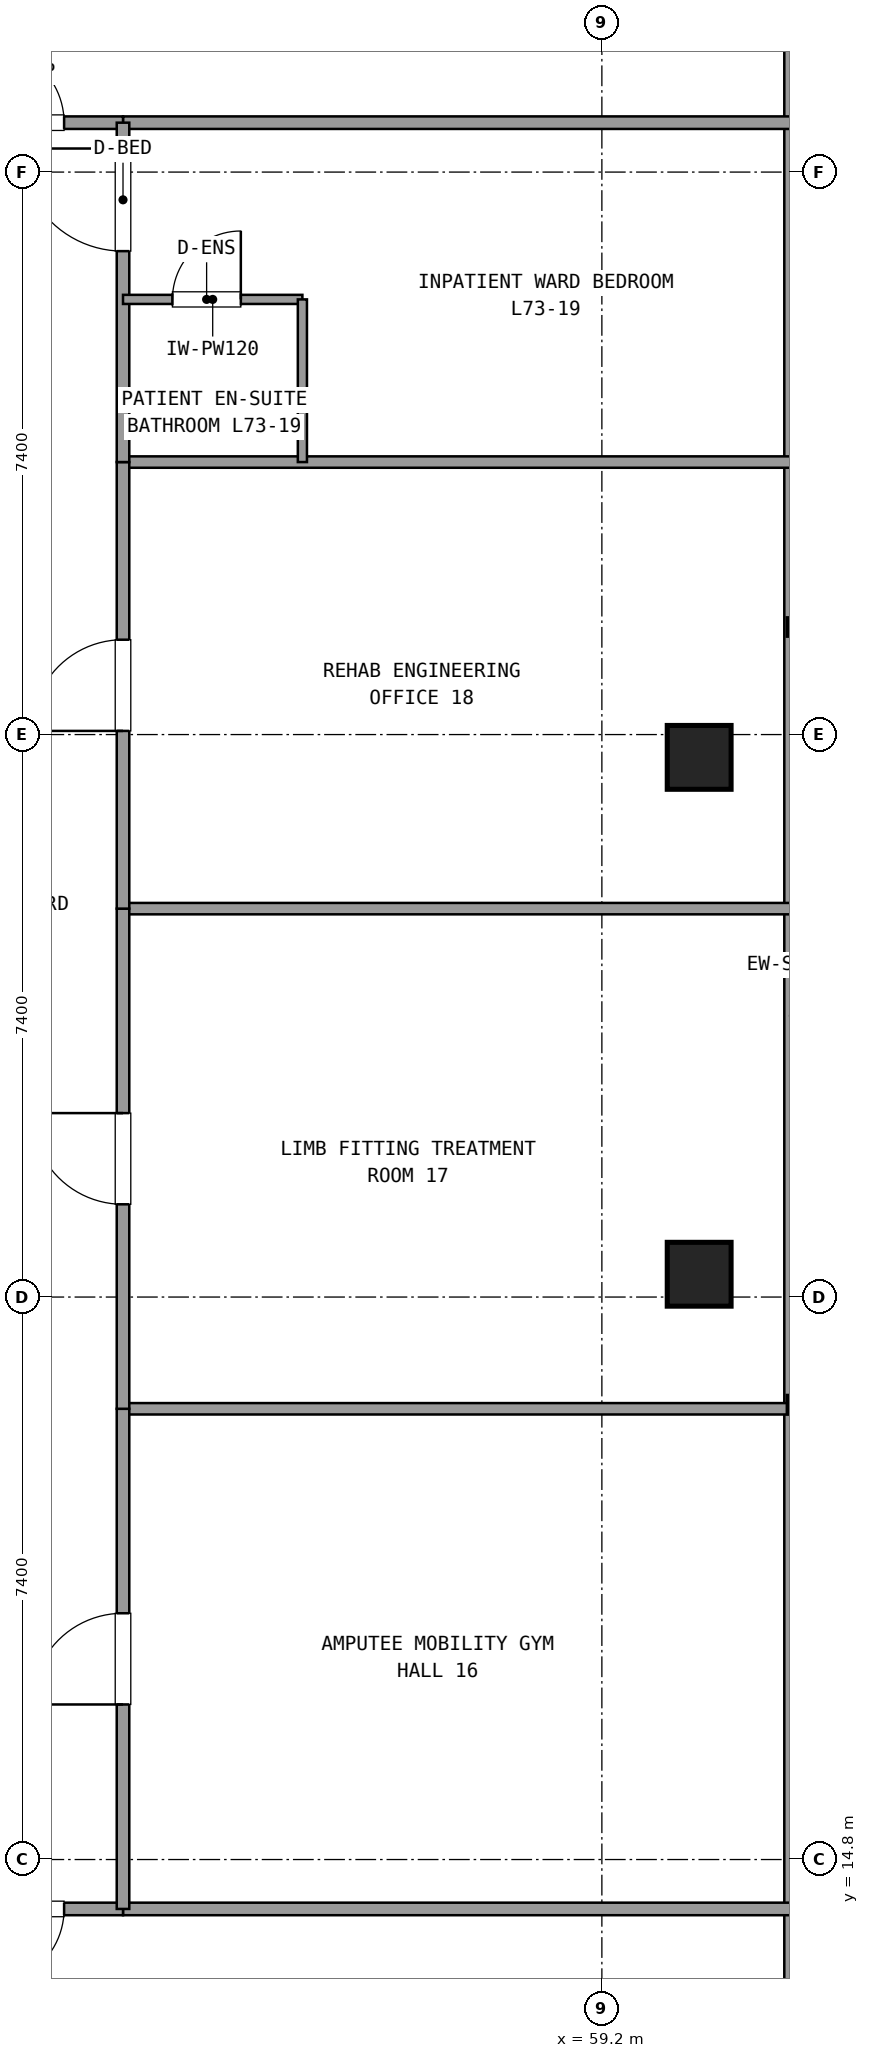
"""IFC4 building model, lengths in metres.
Left out: names, types, materials, properties, quantities, classifications, styles, units other than length and angle.
Written with IfcOpenShell. Run it as: python <this file> out.ifc"""

import sys

from ifc_helpers import new_model, si_unit, direction, frame, frame_2d, origin, origin_2d, place, context, subcontext, project, spatial, rectangle, extrude, element, fill, save


model = new_model("IFC4")
c1 = context("Model", 3, precision=1e-05, world=origin(), true_north=direction((0.0, 1.0)))
c2 = subcontext(c1, "Body", "Model", "MODEL_VIEW")
j1 = project(units=[si_unit("LENGTHUNIT", "METRE"), si_unit("PLANEANGLEUNIT", "RADIAN")], contexts=[c1])
p1 = place(None, origin())
s1 = spatial("IfcSite", under=j1, at=p1, CompositionType="ELEMENT")
p2 = place(p1, origin())
s2 = spatial("IfcBuilding", under=s1, at=p2, CompositionType="ELEMENT")
p3 = place(p2, frame((0.0, 0.0, 282.42)))
s3 = spatial("IfcBuildingStorey", under=s2, at=p3, CompositionType="ELEMENT", Elevation=282.42)
for number, where, z_axis, x_axis in (
    (1, (60.48, 22.5, 0.0), (0.0, 0.0, 1.0), (1.0, 0.0, 0.0)),
    (2, (60.48, 29.3, 0.0), (0.0, 0.0, 1.0), (1.0, 0.0, 0.0)),
):
    element("IfcColumn", number, at=place(p3, frame(where, z_axis=z_axis, x_axis=x_axis)), inside=s3, PredefinedType="COLUMN", context=c2, shape_type="SweptSolid", body=[
        extrude(rectangle(XDim=0.84, YDim=0.84, at=origin_2d()), origin(), (0.0, 0.0, 1.0), 3.6),
    ])
p4 = place(p3, frame((61.72, 10.555, 0.0), z_axis=(0.0, 0.0, 1.0), x_axis=(0.0, 1.0, 0.0)))
e3 = element("IfcWall", 3, at=p4, inside=s3, PredefinedType="SOLIDWALL", context=c2, shape_type="SweptSolid", body=[
    extrude(rectangle(XDim=30.69, YDim=0.24, at=frame_2d((15.345, 0.0))), origin(), (0.0, 0.0, 1.0), 0.85),
])
for number, where, z_axis, x_axis in (
    (4, (52.9, 37.65, 0.0), (0.0, 0.0, 1.0), (1.0, 0.0, 0.0)),
    (5, (52.9, 14.15, 0.0), (0.0, 0.0, 1.0), (1.0, 0.0, 0.0)),
):
    element("IfcWall", number, at=place(p3, frame(where, z_axis=z_axis, x_axis=x_axis)), inside=s3, PredefinedType="PARTITIONING", context=c2, shape_type="SweptSolid", body=[
        extrude(rectangle(XDim=8.8, YDim=0.165, at=frame_2d((4.4, 0.0))), origin(), (0.0, 0.0, 1.0), 2.24),
    ])
p5 = place(p3, frame((50.35, 37.65, 0.0), z_axis=(0.0, 0.0, 1.0), x_axis=(1.0, 0.0, 0.0)))
e6 = element("IfcWall", 6, at=p5, inside=s3, PredefinedType="PARTITIONING", context=c2, shape_type="SweptSolid", body=[
    extrude(rectangle(XDim=2.55, YDim=0.165, at=frame_2d((1.275, 0.0))), origin(), (0.0, 0.0, 1.0), 2.24),
])
p6 = place(p5, frame((0.775, 0.0, 0.0)))
e7 = element("IfcOpeningElement", 7, at=p6, cuts=e6, PredefinedType="OPENING", context=c2, shape_type="SweptSolid", body=[
    extrude(rectangle(XDim=1.0, YDim=2.15, at=frame_2d((0.5, 1.075))), frame((0.0, 0.093, 0.0), z_axis=(0.0, -1.0, 0.0), x_axis=(1.0, 0.0, 0.0)), (0.0, 0.0, 1.0), 0.185),
])
p7 = place(p3, frame((50.35, 14.15, 0.0), z_axis=(0.0, 0.0, 1.0), x_axis=(1.0, 0.0, 0.0)))
e8 = element("IfcWall", 8, at=p7, inside=s3, PredefinedType="PARTITIONING", context=c2, shape_type="SweptSolid", body=[
    extrude(rectangle(XDim=2.55, YDim=0.165, at=frame_2d((1.275, 0.0))), origin(), (0.0, 0.0, 1.0), 2.24),
])
p8 = place(p7, frame((0.775, 0.0, 0.0)))
e9 = element("IfcOpeningElement", 9, at=p8, cuts=e8, PredefinedType="OPENING", context=c2, shape_type="SweptSolid", body=[
    extrude(rectangle(XDim=1.0, YDim=2.15, at=frame_2d((0.5, 1.075))), frame((0.0, 0.093, 0.0), z_axis=(0.0, -1.0, 0.0), x_axis=(1.0, 0.0, 0.0)), (0.0, 0.0, 1.0), 0.185),
])
p9 = place(p3, frame((52.9, 20.73, 0.0), z_axis=(0.0, 0.0, 1.0), x_axis=(1.0, 0.0, 0.0)))
e10 = element("IfcWall", 10, at=p9, inside=s3, PredefinedType="PARTITIONING", context=c2, shape_type="SweptSolid", body=[
    extrude(rectangle(XDim=8.8, YDim=0.15, at=frame_2d((4.4, 0.0))), origin(), (0.0, 0.0, 1.0), 2.24),
])
p10 = place(p3, frame((52.9, 14.15, 0.0), z_axis=(0.0, 0.0, 1.0), x_axis=(0.0, 1.0, 0.0)))
e11 = element("IfcWall", 11, at=p10, inside=s3, PredefinedType="PARTITIONING", context=c2, shape_type="SweptSolid", body=[
    extrude(rectangle(XDim=6.58, YDim=0.165, at=frame_2d((3.29, 0.0))), origin(), (0.0, 0.0, 1.0), 2.24),
])
p11 = place(p10, frame((2.69, 0.0, 0.0)))
e12 = element("IfcOpeningElement", 12, at=p11, cuts=e11, PredefinedType="OPENING", context=c2, shape_type="SweptSolid", body=[
    extrude(rectangle(XDim=1.2, YDim=2.15, at=frame_2d((0.6, 1.075))), frame((0.0, 0.093, 0.0), z_axis=(0.0, -1.0, 0.0), x_axis=(1.0, 0.0, 0.0)), (0.0, 0.0, 1.0), 0.185),
])
p12 = place(p3, frame((52.9, 27.31, 0.0), z_axis=(0.0, 0.0, 1.0), x_axis=(1.0, 0.0, 0.0)))
e13 = element("IfcWall", 13, at=p12, inside=s3, PredefinedType="PARTITIONING", context=c2, shape_type="SweptSolid", body=[
    extrude(rectangle(XDim=8.8, YDim=0.15, at=frame_2d((4.4, 0.0))), origin(), (0.0, 0.0, 1.0), 2.24),
])
p13 = place(p3, frame((52.9, 20.73, 0.0), z_axis=(0.0, 0.0, 1.0), x_axis=(0.0, 1.0, 0.0)))
e14 = element("IfcWall", 14, at=p13, inside=s3, PredefinedType="PARTITIONING", context=c2, shape_type="SweptSolid", body=[
    extrude(rectangle(XDim=6.58, YDim=0.165, at=frame_2d((3.29, 0.0))), origin(), (0.0, 0.0, 1.0), 2.24),
])
p14 = place(p13, frame((2.69, 0.0, 0.0)))
e15 = element("IfcOpeningElement", 15, at=p14, cuts=e14, PredefinedType="OPENING", context=c2, shape_type="SweptSolid", body=[
    extrude(rectangle(XDim=1.2, YDim=2.15, at=frame_2d((0.6, 1.075))), frame((0.0, 0.093, 0.0), z_axis=(0.0, -1.0, 0.0), x_axis=(1.0, 0.0, 0.0)), (0.0, 0.0, 1.0), 0.185),
])
p15 = place(p3, frame((52.9, 33.185, 0.0), z_axis=(0.0, 0.0, 1.0), x_axis=(1.0, 0.0, 0.0)))
e16 = element("IfcWall", 16, at=p15, inside=s3, PredefinedType="PARTITIONING", context=c2, shape_type="SweptSolid", body=[
    extrude(rectangle(XDim=8.8, YDim=0.15, at=frame_2d((4.4, 0.0))), origin(), (0.0, 0.0, 1.0), 2.24),
])
p16 = place(p3, frame((52.9, 27.31, 0.0), z_axis=(0.0, 0.0, 1.0), x_axis=(0.0, 1.0, 0.0)))
e17 = element("IfcWall", 17, at=p16, inside=s3, PredefinedType="PARTITIONING", context=c2, shape_type="SweptSolid", body=[
    extrude(rectangle(XDim=5.875, YDim=0.165, at=frame_2d((2.938, 0.0))), origin(), (0.0, 0.0, 1.0), 2.24),
])
p17 = place(p16, frame((2.338, 0.0, 0.0)))
e18 = element("IfcOpeningElement", 18, at=p17, cuts=e17, PredefinedType="OPENING", context=c2, shape_type="SweptSolid", body=[
    extrude(rectangle(XDim=1.2, YDim=2.15, at=frame_2d((0.6, 1.075))), frame((0.0, 0.093, 0.0), z_axis=(0.0, -1.0, 0.0), x_axis=(1.0, 0.0, 0.0)), (0.0, 0.0, 1.0), 0.185),
])
p18 = place(p3, frame((52.9, 33.185, 0.0), z_axis=(0.0, 0.0, 1.0), x_axis=(0.0, 1.0, 0.0)))
e19 = element("IfcWall", 19, at=p18, inside=s3, PredefinedType="PARTITIONING", context=c2, shape_type="SweptSolid", body=[
    extrude(rectangle(XDim=4.465, YDim=0.165, at=frame_2d((2.232, 0.0))), origin(), (0.0, 0.0, 1.0), 2.24),
])
p19 = place(p18, frame((2.775, 0.0, 0.0)))
e20 = element("IfcOpeningElement", 20, at=p19, cuts=e19, PredefinedType="OPENING", context=c2, shape_type="SweptSolid", body=[
    extrude(rectangle(XDim=1.35, YDim=2.15, at=frame_2d((0.675, 1.075))), frame((0.0, 0.093, 0.0), z_axis=(0.0, -1.0, 0.0), x_axis=(1.0, 0.0, 0.0)), (0.0, 0.0, 1.0), 0.185),
])
p20 = place(p3, frame((52.9, 35.325, 0.0), z_axis=(0.0, 0.0, 1.0), x_axis=(1.0, 0.0, 0.0)))
e21 = element("IfcWall", 21, at=p20, inside=s3, PredefinedType="PLUMBINGWALL", context=c2, shape_type="SweptSolid", body=[
    extrude(rectangle(XDim=2.36, YDim=0.12, at=frame_2d((1.18, 0.0))), origin(), (0.0, 0.0, 1.0), 2.24),
])
p21 = place(p20, frame((0.65, 0.0, 0.0)))
e22 = element("IfcOpeningElement", 22, at=p21, cuts=e21, PredefinedType="OPENING", context=c2, shape_type="SweptSolid", body=[
    extrude(rectangle(XDim=0.9, YDim=2.1, at=frame_2d((0.45, 1.05))), frame((0.0, 0.07, 0.0), z_axis=(0.0, -1.0, 0.0), x_axis=(1.0, 0.0, 0.0)), (0.0, 0.0, 1.0), 0.14),
])
p22 = place(p3, frame((55.26, 33.185, 0.0), z_axis=(0.0, 0.0, 1.0), x_axis=(0.0, 1.0, 0.0)))
e23 = element("IfcWall", 23, at=p22, inside=s3, PredefinedType="PLUMBINGWALL", context=c2, shape_type="SweptSolid", body=[
    extrude(rectangle(XDim=2.14, YDim=0.12, at=frame_2d((1.07, 0.0))), origin(), (0.0, 0.0, 1.0), 2.24),
])
p23 = place(p6, origin())
e24 = element("IfcDoor", 24, at=p23, inside=s3, OperationType="SINGLE_SWING_LEFT", PredefinedType="DOOR", context=c2, shape_type="SweptSolid", body=[
    extrude(rectangle(XDim=1.0, YDim=2.15, at=frame_2d((0.5, 1.075))), frame((0.0, 0.025, 0.0), z_axis=(0.0, -1.0, 0.0), x_axis=(1.0, 0.0, 0.0)), (0.0, 0.0, 1.0), 0.05),
])
fill(e7, e24)
p24 = place(p8, frame((1.0, 0.0, 0.0), z_axis=(0.0, 0.0, 1.0), x_axis=(-1.0, 0.0, 0.0)))
e25 = element("IfcDoor", 25, at=p24, inside=s3, OperationType="SINGLE_SWING_LEFT", PredefinedType="DOOR", context=c2, shape_type="SweptSolid", body=[
    extrude(rectangle(XDim=1.0, YDim=2.15, at=frame_2d((0.5, 1.075))), frame((0.0, 0.025, 0.0), z_axis=(0.0, -1.0, 0.0), x_axis=(1.0, 0.0, 0.0)), (0.0, 0.0, 1.0), 0.05),
])
fill(e9, e25)
p25 = place(p11, origin())
e26 = element("IfcDoor", 26, at=p25, inside=s3, OperationType="SINGLE_SWING_LEFT", PredefinedType="DOOR", context=c2, shape_type="SweptSolid", body=[
    extrude(rectangle(XDim=1.2, YDim=2.15, at=frame_2d((0.6, 1.075))), frame((0.0, 0.025, 0.0), z_axis=(0.0, -1.0, 0.0), x_axis=(1.0, 0.0, 0.0)), (0.0, 0.0, 1.0), 0.05),
])
fill(e12, e26)
p26 = place(p14, origin())
e27 = element("IfcDoor", 27, at=p26, inside=s3, OperationType="SINGLE_SWING_RIGHT", PredefinedType="DOOR", context=c2, shape_type="SweptSolid", body=[
    extrude(rectangle(XDim=1.2, YDim=2.15, at=frame_2d((0.6, 1.075))), frame((0.0, 0.025, 0.0), z_axis=(0.0, -1.0, 0.0), x_axis=(1.0, 0.0, 0.0)), (0.0, 0.0, 1.0), 0.05),
])
fill(e15, e27)
p27 = place(p17, origin())
e28 = element("IfcDoor", 28, at=p27, inside=s3, OperationType="SINGLE_SWING_LEFT", PredefinedType="DOOR", context=c2, shape_type="SweptSolid", body=[
    extrude(rectangle(XDim=1.2, YDim=2.15, at=frame_2d((0.6, 1.075))), frame((0.0, 0.025, 0.0), z_axis=(0.0, -1.0, 0.0), x_axis=(1.0, 0.0, 0.0)), (0.0, 0.0, 1.0), 0.05),
])
fill(e18, e28)
p28 = place(p21, origin())
e29 = element("IfcDoor", 29, at=p28, inside=s3, OperationType="SINGLE_SWING_RIGHT", PredefinedType="DOOR", context=c2, shape_type="SweptSolid", body=[
    extrude(rectangle(XDim=0.9, YDim=2.1, at=frame_2d((0.45, 1.05))), frame((0.0, 0.025, 0.0), z_axis=(0.0, -1.0, 0.0), x_axis=(1.0, 0.0, 0.0)), (0.0, 0.0, 1.0), 0.05),
])
fill(e22, e29)
p29 = place(p19, origin())
e30 = element("IfcDoor", 30, at=p29, inside=s3, OperationType="SINGLE_SWING_RIGHT", PredefinedType="DOOR", context=c2, shape_type="SweptSolid", body=[
    extrude(rectangle(XDim=1.35, YDim=2.15, at=frame_2d((0.675, 1.075))), frame((0.0, 0.025, 0.0), z_axis=(0.0, -1.0, 0.0), x_axis=(1.0, 0.0, 0.0)), (0.0, 0.0, 1.0), 0.05),
])
fill(e20, e30)
save(model, sys.argv[1])
